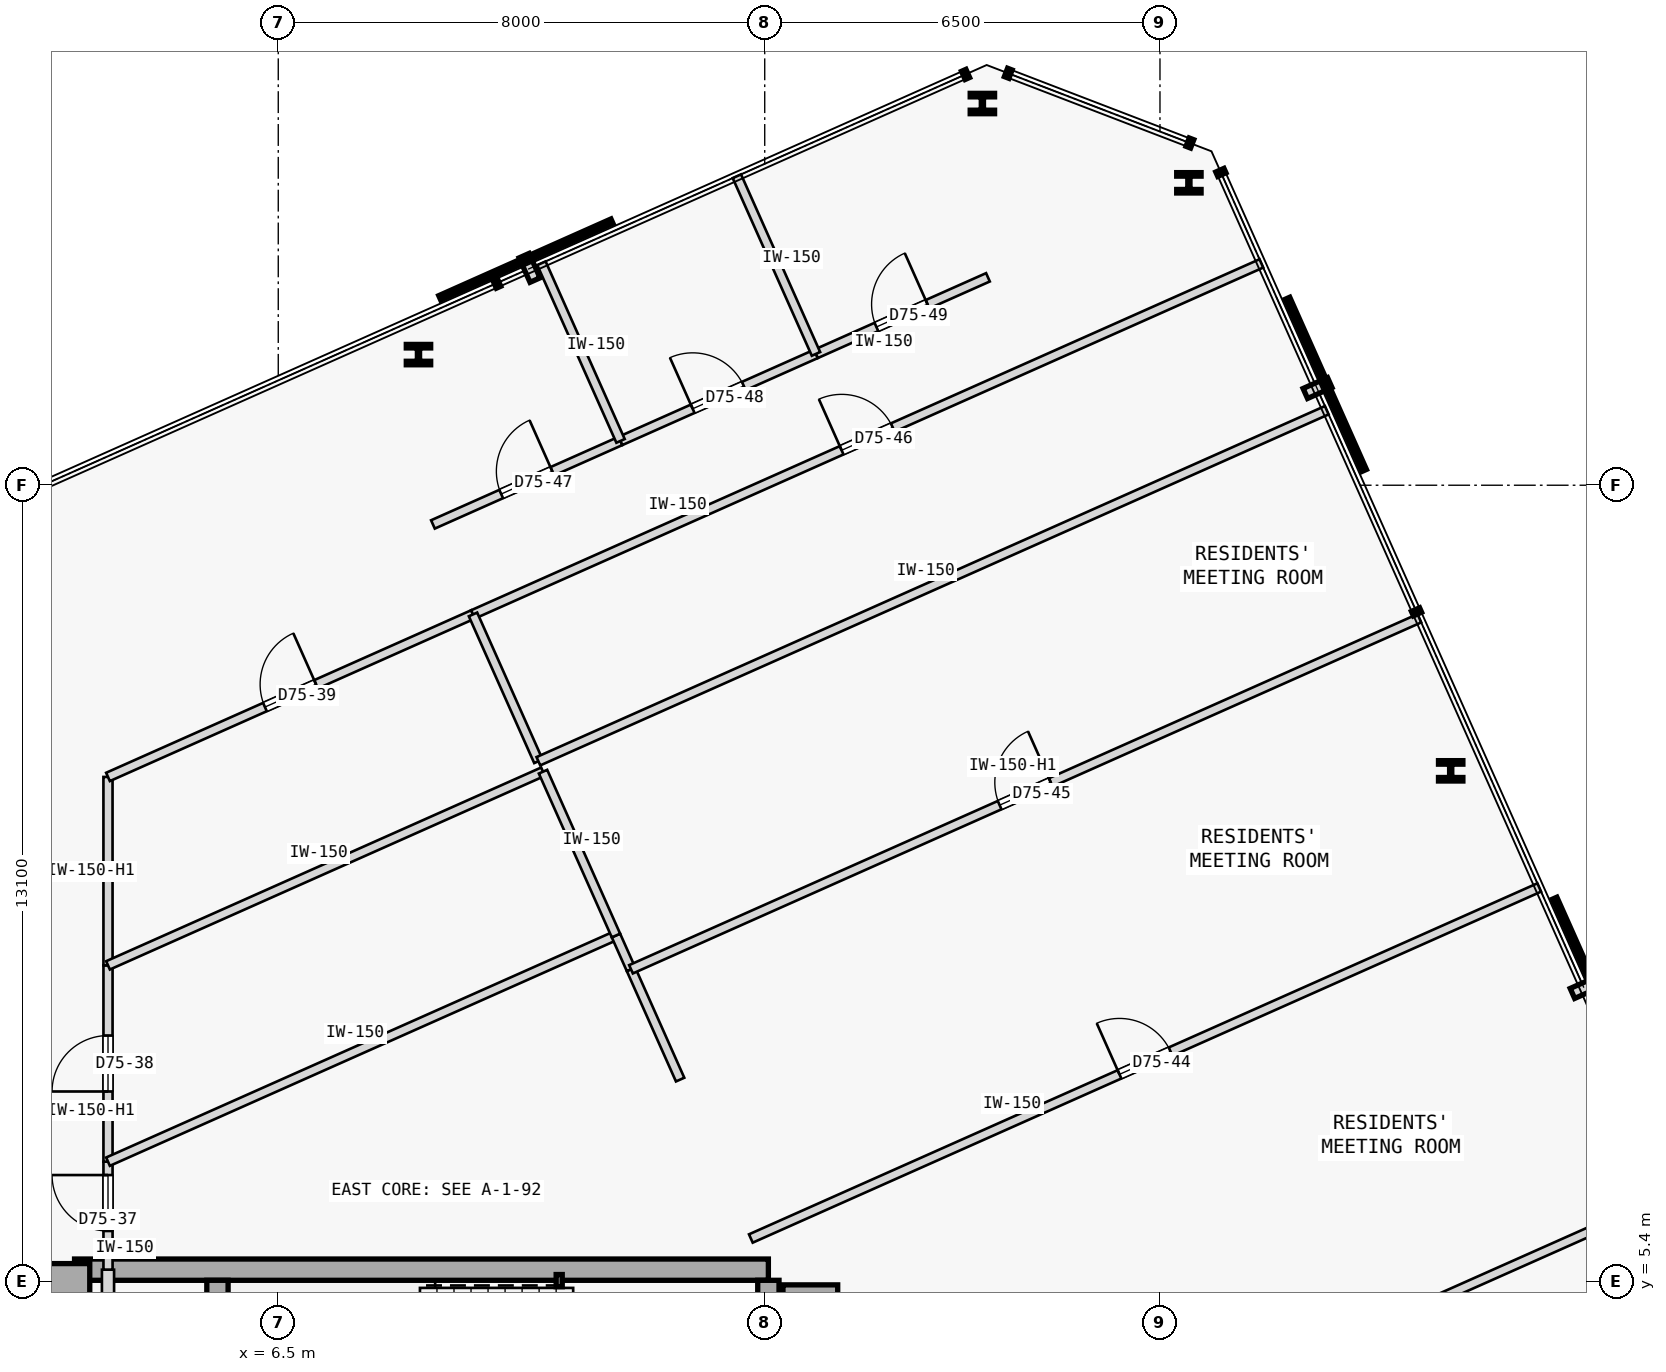
"""IFC4 building model, lengths in metres.
Left out: names, types, materials, properties, quantities, classifications, styles, units other than length and angle.
Written with IfcOpenShell. Run it as: python <this file> out.ifc"""

import sys

from ifc_helpers import new_model, si_unit, direction, frame, frame_2d, origin, origin_2d, place, context, subcontext, project, spatial, rectangle, hollow_rectangle, i_section, extrude, element, fill, save


model = new_model("IFC4")
c1 = context("Model", 3, precision=1e-05, world=origin(), true_north=direction((0.0, 1.0)))
c2 = subcontext(c1, "Body", "Model", "MODEL_VIEW")
j1 = project(units=[si_unit("LENGTHUNIT", "METRE"), si_unit("PLANEANGLEUNIT", "RADIAN")], contexts=[c1])
p1 = place(None, origin())
s1 = spatial("IfcSite", under=j1, at=p1, CompositionType="ELEMENT")
p2 = place(p1, origin())
s2 = spatial("IfcBuilding", under=s1, at=p2, CompositionType="ELEMENT")
p3 = place(p2, frame((0.0, 0.0, 281.9)))
s3 = spatial("IfcBuildingStorey", under=s2, at=p3, CompositionType="ELEMENT", Elevation=281.9)
for number, where, z_axis, x_axis in (
    (1, (15.25, 4.9, 0.0), (0.0, 0.0, 1.0), (1.0, 0.0, 0.0)),
    (2, (2.95, 5.25, 0.0), (0.0, 0.0, 1.0), (1.0, 0.0, 0.0)),
):
    element("IfcColumn", number, at=place(p3, frame(where, z_axis=z_axis, x_axis=x_axis)), inside=s3, PredefinedType="COLUMN", context=c2, shape_type="SweptSolid", body=[
        extrude(rectangle(XDim=0.9, YDim=0.9, at=origin_2d()), origin(), (0.0, 0.0, 1.0), 3.35),
    ])
p4 = place(p3, frame((3.15, 5.6, 0.0), z_axis=(0.0, 0.0, 1.0), x_axis=(1.0, 0.0, 0.0)))
e3 = element("IfcWall", 3, at=p4, inside=s3, PredefinedType="SHEAR", context=c2, shape_type="SweptSolid", body=[
    extrude(rectangle(XDim=11.41, YDim=0.35, at=frame_2d((5.705, 0.0))), origin(), (0.0, 0.0, 1.0), 3.125),
])
p5 = place(p3, frame((14.56, -5.425, 0.0), z_axis=(0.0, 0.0, 1.0), x_axis=(0.0, 1.0, 0.0)))
e4 = element("IfcWall", 4, at=p5, inside=s3, PredefinedType="SHEAR", context=c2, shape_type="SweptSolid", body=[
    extrude(rectangle(XDim=10.85, YDim=0.35, at=frame_2d((5.425, 0.0))), origin(), (0.0, 0.0, 1.0), 3.125),
])
p6 = place(p3, frame((5.5, 2.15, 0.0), z_axis=(0.0, 0.0, 1.0), x_axis=(0.0, 1.0, 0.0)))
e5 = element("IfcWall", 5, at=p6, inside=s3, PredefinedType="SHEAR", context=c2, shape_type="SweptSolid", body=[
    extrude(rectangle(XDim=3.275, YDim=0.35, at=frame_2d((1.638, 0.0))), origin(), (0.0, 0.0, 1.0), 3.125),
])
p7 = place(p3, frame((11.12, 5.42, 0.0), z_axis=(0.0, 0.0, 1.0), x_axis=(1.0, 0.0, 0.0)))
e6 = element("IfcColumn", 6, at=p7, inside=s3, PredefinedType="COLUMN", context=c2, shape_type="SweptSolid", body=[
    extrude(hollow_rectangle(XDim=0.1, YDim=0.2, WallThickness=0.008, at=origin_2d()), origin(), (0.0, 0.0, 1.0), 3.35),
])
for number, where, z_axis, x_axis in (
    (7, (25.781, 13.803, 0.0), (0.0, 0.0, 1.0), (1.0, 0.0, 0.0)),
    (8, (21.476, 23.473, 0.0), (0.0, 0.0, 1.0), (1.0, 0.0, 0.0)),
    (9, (18.08, 24.777, 0.0), (0.0, 0.0, 1.0), (1.0, 0.0, 0.0)),
    (10, (8.806, 20.648, 0.0), (0.0, 0.0, 1.0), (1.0, 0.0, 0.0)),
):
    element("IfcColumn", number, at=place(p3, frame(where, z_axis=z_axis, x_axis=x_axis)), inside=s3, PredefinedType="COLUMN", context=c2, shape_type="SweptSolid", body=[
        extrude(i_section(OverallWidth=0.401, OverallDepth=0.335, WebThickness=0.036, FlangeThickness=0.058, FilletRadius=0.015, at=origin_2d()), origin(), (0.0, 0.0, 1.0), 3.35),
    ])
p8 = place(p3, frame((3.7, -1.15, 0.0), z_axis=(0.0, 0.0, 1.0), x_axis=(0.0, 1.0, 0.0)))
e11 = element("IfcWall", 11, at=p8, inside=s3, PredefinedType="STANDARD", context=c2, shape_type="SweptSolid", body=[
    extrude(rectangle(XDim=6.75, YDim=0.2, at=frame_2d((3.375, 0.0))), origin(), (0.0, 0.0, 1.0), 3.125),
])
p9 = place(p8, frame((3.6, 0.0, 0.0)))
e12 = element("IfcOpeningElement", 12, at=p9, cuts=e11, PredefinedType="OPENING", context=c2, shape_type="SweptSolid", body=[
    extrude(rectangle(XDim=0.92, YDim=2.15, at=frame_2d((0.46, 1.075))), frame((0.0, 0.11, 0.0), z_axis=(0.0, -1.0, 0.0), x_axis=(1.0, 0.0, 0.0)), (0.0, 0.0, 1.0), 0.22),
])
p10 = place(p3, frame((3.7, 5.601, 0.0), z_axis=(0.0, 0.0, 1.0), x_axis=(0.0, 1.0, 0.0)))
e13 = element("IfcWall", 13, at=p10, inside=s3, PredefinedType="PARTITIONING", context=c2, shape_type="SweptSolid", body=[
    extrude(rectangle(XDim=1.775, YDim=0.15, at=frame_2d((0.888, 0.0))), origin(), (0.0, 0.0, 1.0), 3.125),
])
p11 = place(p10, frame((0.635, 0.0, 0.0)))
e14 = element("IfcOpeningElement", 14, at=p11, cuts=e13, PredefinedType="OPENING", context=c2, shape_type="SweptSolid", body=[
    extrude(rectangle(XDim=0.92, YDim=2.15, at=frame_2d((0.46, 1.075))), frame((0.0, 0.085, 0.0), z_axis=(0.0, -1.0, 0.0), x_axis=(1.0, 0.0, 0.0)), (0.0, 0.0, 1.0), 0.17),
])
p12 = place(p3, frame((3.7, 7.376, 0.0), z_axis=(0.0, 0.0, 1.0), x_axis=(0.0, 1.0, 0.0)))
e15 = element("IfcWall", 15, at=p12, inside=s3, PredefinedType="PARTITIONING", context=c2, shape_type="SweptSolid", body=[
    extrude(rectangle(XDim=3.228, YDim=0.15, at=frame_2d((1.614, 0.0))), origin(), (0.0, 0.0, 1.0), 2.675),
])
p13 = place(p12, frame((1.154, 0.0, 0.0)))
e16 = element("IfcOpeningElement", 16, at=p13, cuts=e15, PredefinedType="OPENING", context=c2, shape_type="SweptSolid", body=[
    extrude(rectangle(XDim=0.92, YDim=2.15, at=frame_2d((0.46, 1.075))), frame((0.0, 0.085, 0.0), z_axis=(0.0, -1.0, 0.0), x_axis=(1.0, 0.0, 0.0)), (0.0, 0.0, 1.0), 0.17),
])
p14 = place(p3, frame((3.7, 10.604, 0.0), z_axis=(0.0, 0.0, 1.0), x_axis=(-0.000157567161, 0.999999987586, 0.0)))
e17 = element("IfcWall", 17, at=p14, inside=s3, PredefinedType="PARTITIONING", context=c2, shape_type="SweptSolid", body=[
    extrude(rectangle(XDim=3.099, YDim=0.15, at=frame_2d((1.549, 0.0))), origin(), (0.0, 0.0, 1.0), 2.675),
])
p15 = place(p3, frame((3.7, 13.703, 0.0), z_axis=(0.0, 0.0, 1.0), x_axis=(0.913549363376, 0.406727870542, 0.0)))
e18 = element("IfcWall", 18, at=p15, inside=s3, PredefinedType="PARTITIONING", context=c2, shape_type="SweptSolid", body=[
    extrude(rectangle(XDim=6.571, YDim=0.15, at=frame_2d((3.286, 0.0))), origin(), (0.0, 0.0, 1.0), 3.125),
])
p16 = place(p15, frame((2.825, 0.0, 0.0)))
e19 = element("IfcOpeningElement", 19, at=p16, cuts=e18, PredefinedType="OPENING", context=c2, shape_type="SweptSolid", body=[
    extrude(rectangle(XDim=0.92, YDim=2.15, at=frame_2d((0.46, 1.075))), frame((0.0, 0.085, 0.0), z_axis=(0.0, -1.0, 0.0), x_axis=(1.0, 0.0, 0.0)), (0.0, 0.0, 1.0), 0.17),
])
p17 = place(p3, frame((9.703, 16.375, 0.0), z_axis=(0.0, 0.0, 1.0), x_axis=(0.913544622417, 0.406738519018, 0.0)))
e20 = element("IfcWall", 20, at=p17, inside=s3, PredefinedType="PARTITIONING", context=c2, shape_type="SweptSolid", body=[
    extrude(rectangle(XDim=14.192, YDim=0.15, at=frame_2d((7.096, 0.0))), origin(), (0.0, 0.0, 1.0), 3.125),
])
p18 = place(p17, frame((6.636, 0.0, 0.0)))
e21 = element("IfcOpeningElement", 21, at=p18, cuts=e20, PredefinedType="OPENING", context=c2, shape_type="SweptSolid", body=[
    extrude(rectangle(XDim=0.92, YDim=2.15, at=frame_2d((0.46, 1.075))), frame((0.0, 0.085, 0.0), z_axis=(0.0, -1.0, 0.0), x_axis=(1.0, 0.0, 0.0)), (0.0, 0.0, 1.0), 0.17),
])
p19 = place(p3, frame((9.044, 17.855, 0.0), z_axis=(0.0, 0.0, 1.0), x_axis=(0.913554990523, 0.406715231201, 0.0)))
e22 = element("IfcWall", 22, at=p19, inside=s3, PredefinedType="PARTITIONING", context=c2, shape_type="SweptSolid", body=[
    extrude(rectangle(XDim=3.377, YDim=0.15, at=frame_2d((1.688, 0.0))), origin(), (0.0, 0.0, 1.0), 3.125),
])
p20 = place(p19, frame((1.229, 0.0, 0.0)))
e23 = element("IfcOpeningElement", 23, at=p20, cuts=e22, PredefinedType="OPENING", context=c2, shape_type="SweptSolid", body=[
    extrude(rectangle(XDim=0.92, YDim=2.15, at=frame_2d((0.46, 1.075))), frame((0.0, 0.085, 0.0), z_axis=(0.0, -1.0, 0.0), x_axis=(1.0, 0.0, 0.0)), (0.0, 0.0, 1.0), 0.17),
])
p21 = place(p3, frame((12.129, 19.229, 0.0), z_axis=(0.0, 0.0, 1.0), x_axis=(0.913545210441, 0.406737198298, 0.0)))
e24 = element("IfcWall", 24, at=p21, inside=s3, PredefinedType="PARTITIONING", context=c2, shape_type="SweptSolid", body=[
    extrude(rectangle(XDim=3.518, YDim=0.15, at=frame_2d((1.759, 0.0))), origin(), (0.0, 0.0, 1.0), 3.125),
])
p22 = place(p21, frame((1.299, 0.0, 0.0)))
e25 = element("IfcOpeningElement", 25, at=p22, cuts=e24, PredefinedType="OPENING", context=c2, shape_type="SweptSolid", body=[
    extrude(rectangle(XDim=0.92, YDim=2.15, at=frame_2d((0.46, 1.075))), frame((0.0, 0.085, 0.0), z_axis=(0.0, -1.0, 0.0), x_axis=(1.0, 0.0, 0.0)), (0.0, 0.0, 1.0), 0.17),
])
p23 = place(p3, frame((15.343, 20.66, 0.0), z_axis=(0.0, 0.0, 1.0), x_axis=(0.913531658173, 0.406767635778, 0.0)))
e26 = element("IfcWall", 26, at=p23, inside=s3, PredefinedType="PARTITIONING", context=c2, shape_type="SweptSolid", body=[
    extrude(rectangle(XDim=3.096, YDim=0.15, at=frame_2d((1.548, 0.0))), origin(), (0.0, 0.0, 1.0), 3.125),
])
p24 = place(p23, frame((1.088, 0.0, 0.0)))
e27 = element("IfcOpeningElement", 27, at=p24, cuts=e26, PredefinedType="OPENING", context=c2, shape_type="SweptSolid", body=[
    extrude(rectangle(XDim=0.92, YDim=2.15, at=frame_2d((0.46, 1.075))), frame((0.0, 0.085, 0.0), z_axis=(0.0, -1.0, 0.0), x_axis=(1.0, 0.0, 0.0)), (0.0, 0.0, 1.0), 0.17),
])
p25 = place(p3, frame((3.7, 7.376, 0.0), z_axis=(0.0, 0.0, 1.0), x_axis=(0.91354490899, 0.406737875367, 0.0)))
e28 = element("IfcWall", 28, at=p25, inside=s3, PredefinedType="PARTITIONING", context=c2, shape_type="SweptSolid", body=[
    extrude(rectangle(XDim=9.144, YDim=0.15, at=frame_2d((4.572, 0.0))), origin(), (0.0, 0.0, 1.0), 3.125),
])
p26 = place(p3, frame((13.109, 8.726, 0.0), z_axis=(0.0, 0.0, 1.0), x_axis=(-0.406788519224, 0.913522359128, 0.0)))
e29 = element("IfcWall", 29, at=p26, inside=s3, PredefinedType="PARTITIONING", context=c2, shape_type="SweptSolid", body=[
    extrude(rectangle(XDim=1.986, YDim=0.15, at=frame_2d((0.993, 0.0))), origin(), (0.0, 0.0, 1.0), 3.125),
])
p27 = place(p3, frame((12.301, 10.54, 0.0), z_axis=(0.0, 0.0, 1.0), x_axis=(-0.406436552015, 0.913679007741, 0.0)))
e30 = element("IfcWall", 30, at=p27, inside=s3, PredefinedType="PARTITIONING", context=c2, shape_type="SweptSolid", body=[
    extrude(rectangle(XDim=0.608, YDim=0.15, at=frame_2d((0.304, 0.0))), origin(), (0.0, 0.0, 1.0), 3.125),
])
p28 = place(p3, frame((3.7, 10.604, 0.0), z_axis=(0.0, 0.0, 1.0), x_axis=(0.913534926439, 0.406760295722, 0.0)))
e31 = element("IfcWall", 31, at=p28, inside=s3, PredefinedType="PARTITIONING", context=c2, shape_type="SweptSolid", body=[
    extrude(rectangle(XDim=7.831, YDim=0.15, at=frame_2d((3.916, 0.0))), origin(), (0.0, 0.0, 1.0), 3.125),
])
p29 = place(p3, frame((12.054, 11.095, 0.0), z_axis=(0.0, 0.0, 1.0), x_axis=(-0.406798922371, 0.91351772657, 0.0)))
e32 = element("IfcWall", 32, at=p29, inside=s3, PredefinedType="PARTITIONING", context=c2, shape_type="SweptSolid", body=[
    extrude(rectangle(XDim=2.949, YDim=0.15, at=frame_2d((1.475, 0.0))), origin(), (0.0, 0.0, 1.0), 3.125),
])
p30 = place(p3, frame((10.778, 13.961, 0.0), z_axis=(0.0, 0.0, 1.0), x_axis=(-0.406712614091, 0.913556155657, 0.0)))
e33 = element("IfcWall", 33, at=p30, inside=s3, PredefinedType="PARTITIONING", context=c2, shape_type="SweptSolid", body=[
    extrude(rectangle(XDim=2.643, YDim=0.15, at=frame_2d((1.322, 0.0))), origin(), (0.0, 0.0, 1.0), 3.125),
])
p31 = place(p3, frame((16.512, 1.082, 0.0), z_axis=(0.0, 0.0, 1.0), x_axis=(0.913544622417, 0.406738519018, 0.0)))
e34 = element("IfcWall", 34, at=p31, inside=s3, PredefinedType="PARTITIONING", context=c2, shape_type="SweptSolid", body=[
    extrude(rectangle(XDim=14.192, YDim=0.15, at=frame_2d((7.096, 0.0))), origin(), (0.0, 0.0, 1.0), 3.125),
])
p32 = place(p31, frame((6.636, 0.0, 0.0)))
e35 = element("IfcOpeningElement", 35, at=p32, cuts=e34, PredefinedType="OPENING", context=c2, shape_type="SweptSolid", body=[
    extrude(rectangle(XDim=0.92, YDim=2.15, at=frame_2d((0.46, 1.075))), frame((0.0, 0.085, 0.0), z_axis=(0.0, -1.0, 0.0), x_axis=(1.0, 0.0, 0.0)), (0.0, 0.0, 1.0), 0.17),
])
p33 = place(p3, frame((14.272, 6.113, 0.0), z_axis=(0.0, 0.0, 1.0), x_axis=(0.913551014388, 0.406724162191, 0.0)))
e36 = element("IfcWall", 36, at=p33, inside=s3, PredefinedType="PARTITIONING", context=c2, shape_type="SweptSolid", body=[
    extrude(rectangle(XDim=14.192, YDim=0.15, at=frame_2d((7.096, 0.0))), origin(), (0.0, 0.0, 1.0), 3.125),
])
p34 = place(p33, frame((6.636, 0.0, 0.0)))
e37 = element("IfcOpeningElement", 37, at=p34, cuts=e36, PredefinedType="OPENING", context=c2, shape_type="SweptSolid", body=[
    extrude(rectangle(XDim=0.92, YDim=2.15, at=frame_2d((0.46, 1.075))), frame((0.0, 0.085, 0.0), z_axis=(0.0, -1.0, 0.0), x_axis=(1.0, 0.0, 0.0)), (0.0, 0.0, 1.0), 0.17),
])
p35 = place(p3, frame((12.301, 10.54, 0.0), z_axis=(0.0, 0.0, 1.0), x_axis=(0.913544622417, 0.406738519018, 0.0)))
e38 = element("IfcWall", 38, at=p35, inside=s3, PredefinedType="PARTITIONING", context=c2, shape_type="SweptSolid", body=[
    extrude(rectangle(XDim=14.192, YDim=0.15, at=frame_2d((7.096, 0.0))), origin(), (0.0, 0.0, 1.0), 2.675),
])
p36 = place(p35, frame((6.636, 0.0, 0.0)))
e39 = element("IfcOpeningElement", 39, at=p36, cuts=e38, PredefinedType="OPENING", context=c2, shape_type="SweptSolid", body=[
    extrude(rectangle(XDim=0.92, YDim=2.15, at=frame_2d((0.46, 1.075))), frame((0.0, 0.085, 0.0), z_axis=(0.0, -1.0, 0.0), x_axis=(1.0, 0.0, 0.0)), (0.0, 0.0, 1.0), 0.17),
])
p37 = place(p3, frame((10.778, 13.961, 0.0), z_axis=(0.0, 0.0, 1.0), x_axis=(0.913544622417, 0.406738519018, 0.0)))
e40 = element("IfcWall", 40, at=p37, inside=s3, PredefinedType="PARTITIONING", context=c2, shape_type="SweptSolid", body=[
    extrude(rectangle(XDim=14.192, YDim=0.15, at=frame_2d((7.096, 0.0))), origin(), (0.0, 0.0, 1.0), 3.125),
])
for number, where, z_axis, x_axis in (
    (41, (12.129, 19.229, 0.0), (0.0, 0.0, 1.0), (-0.407, 0.914, 0.0)),
    (42, (15.343, 20.66, 0.0), (0.0, 0.0, 1.0), (-0.407, 0.914, 0.0)),
):
    element("IfcWall", number, at=place(p3, frame(where, z_axis=z_axis, x_axis=x_axis)), inside=s3, PredefinedType="PARTITIONING", context=c2, shape_type="SweptSolid", body=[
        extrude(rectangle(XDim=3.198, YDim=0.15, at=frame_2d((1.599, 0.0))), origin(), (0.0, 0.0, 1.0), 3.125),
    ])
p38 = place(p11, origin())
e43 = element("IfcDoor", 43, at=p38, inside=s3, OperationType="SINGLE_SWING_RIGHT", PredefinedType="DOOR", context=c2, shape_type="SweptSolid", body=[
    extrude(rectangle(XDim=0.92, YDim=2.15, at=frame_2d((0.46, 1.075))), frame((0.0, 0.025, 0.0), z_axis=(0.0, -1.0, 0.0), x_axis=(1.0, 0.0, 0.0)), (0.0, 0.0, 1.0), 0.05),
])
fill(e14, e43)
p39 = place(p13, origin())
e44 = element("IfcDoor", 44, at=p39, inside=s3, OperationType="SINGLE_SWING_LEFT", PredefinedType="DOOR", context=c2, shape_type="SweptSolid", body=[
    extrude(rectangle(XDim=0.92, YDim=2.15, at=frame_2d((0.46, 1.075))), frame((0.0, 0.025, 0.0), z_axis=(0.0, -1.0, 0.0), x_axis=(1.0, 0.0, 0.0)), (0.0, 0.0, 1.0), 0.05),
])
fill(e16, e44)
p40 = place(p16, origin())
e45 = element("IfcDoor", 45, at=p40, inside=s3, OperationType="SINGLE_SWING_RIGHT", PredefinedType="DOOR", context=c2, shape_type="SweptSolid", body=[
    extrude(rectangle(XDim=0.92, YDim=2.15, at=frame_2d((0.46, 1.075))), frame((0.0, 0.025, 0.0), z_axis=(0.0, -1.0, 0.0), x_axis=(1.0, 0.0, 0.0)), (0.0, 0.0, 1.0), 0.05),
])
fill(e19, e45)
p41 = place(p34, origin())
e46 = element("IfcDoor", 46, at=p41, inside=s3, OperationType="SINGLE_SWING_LEFT", PredefinedType="DOOR", context=c2, shape_type="SweptSolid", body=[
    extrude(rectangle(XDim=0.92, YDim=2.15, at=frame_2d((0.46, 1.075))), frame((0.0, 0.025, 0.0), z_axis=(0.0, -1.0, 0.0), x_axis=(1.0, 0.0, 0.0)), (0.0, 0.0, 1.0), 0.05),
])
fill(e37, e46)
p42 = place(p36, origin())
e47 = element("IfcDoor", 47, at=p42, inside=s3, OperationType="SINGLE_SWING_RIGHT", PredefinedType="DOOR", context=c2, shape_type="SweptSolid", body=[
    extrude(rectangle(XDim=0.92, YDim=2.15, at=frame_2d((0.46, 1.075))), frame((0.0, 0.025, 0.0), z_axis=(0.0, -1.0, 0.0), x_axis=(1.0, 0.0, 0.0)), (0.0, 0.0, 1.0), 0.05),
])
fill(e39, e47)
p43 = place(p18, origin())
e48 = element("IfcDoor", 48, at=p43, inside=s3, OperationType="SINGLE_SWING_LEFT", PredefinedType="DOOR", context=c2, shape_type="SweptSolid", body=[
    extrude(rectangle(XDim=0.92, YDim=2.15, at=frame_2d((0.46, 1.075))), frame((0.0, 0.025, 0.0), z_axis=(0.0, -1.0, 0.0), x_axis=(1.0, 0.0, 0.0)), (0.0, 0.0, 1.0), 0.05),
])
fill(e21, e48)
p44 = place(p20, origin())
e49 = element("IfcDoor", 49, at=p44, inside=s3, OperationType="SINGLE_SWING_RIGHT", PredefinedType="DOOR", context=c2, shape_type="SweptSolid", body=[
    extrude(rectangle(XDim=0.92, YDim=2.15, at=frame_2d((0.46, 1.075))), frame((0.0, 0.025, 0.0), z_axis=(0.0, -1.0, 0.0), x_axis=(1.0, 0.0, 0.0)), (0.0, 0.0, 1.0), 0.05),
])
fill(e23, e49)
p45 = place(p22, origin())
e50 = element("IfcDoor", 50, at=p45, inside=s3, OperationType="SINGLE_SWING_LEFT", PredefinedType="DOOR", context=c2, shape_type="SweptSolid", body=[
    extrude(rectangle(XDim=0.92, YDim=2.15, at=frame_2d((0.46, 1.075))), frame((0.0, 0.025, 0.0), z_axis=(0.0, -1.0, 0.0), x_axis=(1.0, 0.0, 0.0)), (0.0, 0.0, 1.0), 0.05),
])
fill(e25, e50)
p46 = place(p24, origin())
e51 = element("IfcDoor", 51, at=p46, inside=s3, OperationType="SINGLE_SWING_RIGHT", PredefinedType="DOOR", context=c2, shape_type="SweptSolid", body=[
    extrude(rectangle(XDim=0.92, YDim=2.15, at=frame_2d((0.46, 1.075))), frame((0.0, 0.025, 0.0), z_axis=(0.0, -1.0, 0.0), x_axis=(1.0, 0.0, 0.0)), (0.0, 0.0, 1.0), 0.05),
])
fill(e27, e51)
save(model, sys.argv[1])
